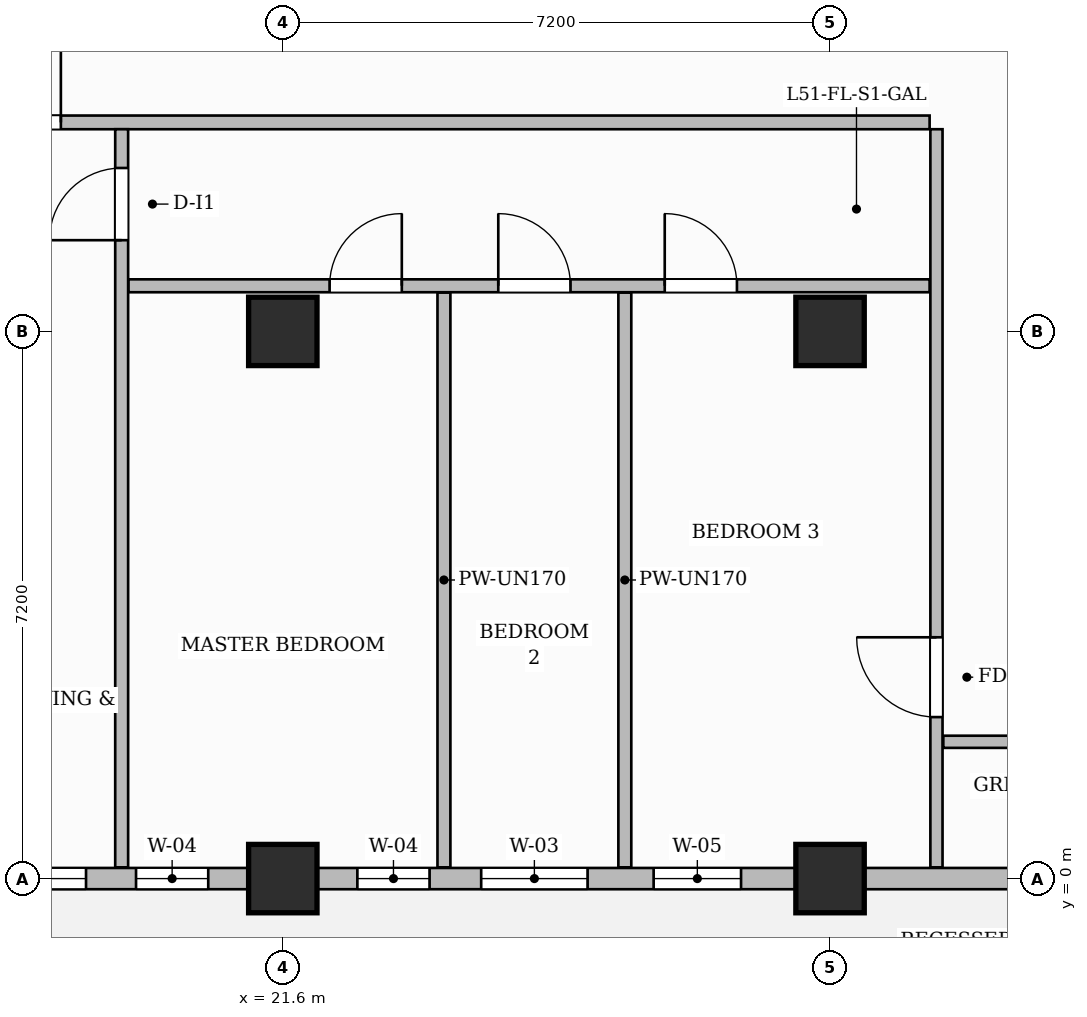
"""IFC4 building model, lengths in metres.
Left out: names, types, materials, properties, quantities, classifications, styles, units other than length and angle.
Written with IfcOpenShell. Run it as: python <this file> out.ifc"""

import sys

from ifc_helpers import new_model, si_unit, direction, frame, frame_2d, origin, origin_2d, place, context, subcontext, project, spatial, rectangle, extrude, source, transform, mapped, element, fill, save


model = new_model("IFC4")
c1 = context("Model", 3, precision=1e-05, world=origin(), true_north=direction((0.0, 1.0)))
c2 = subcontext(c1, "Body", "Model", "MODEL_VIEW")
j1 = project(units=[si_unit("LENGTHUNIT", "METRE"), si_unit("PLANEANGLEUNIT", "RADIAN")], contexts=[c1])
p1 = place(None, origin())
s1 = spatial("IfcSite", under=j1, at=p1, CompositionType="ELEMENT")
p2 = place(p1, origin())
s2 = spatial("IfcBuilding", under=s1, at=p2, CompositionType="ELEMENT")
p3 = place(p2, frame((0.0, 0.0, 205.75)))
s3 = spatial("IfcBuildingStorey", under=s2, at=p3, CompositionType="ELEMENT", Elevation=205.75)
m1 = source(origin(), c2, "Body", "SweptSolid", [
    extrude(rectangle(XDim=0.9, YDim=0.9, at=origin_2d()), origin(), (0.0, 0.0, 1.0), 3.85),
])
for number, where, z_axis, x_axis in (
    (1, (21.6, 0.0, 0.0), (0.0, 0.0, 1.0), (1.0, 0.0, 0.0)),
    (2, (21.6, 7.2, 0.0), (0.0, 0.0, 1.0), (1.0, 0.0, 0.0)),
    (3, (28.8, 0.0, 0.0), (0.0, 0.0, 1.0), (1.0, 0.0, 0.0)),
    (4, (28.8, 7.2, 0.0), (0.0, 0.0, 1.0), (1.0, 0.0, 0.0)),
):
    element("IfcColumn", number, at=place(p3, frame(where, z_axis=z_axis, x_axis=x_axis)), inside=s3, PredefinedType="COLUMN", context=c2, shape_type="MappedRepresentation", body=[
        mapped(m1, transform((0.0, 0.0, 0.0), scale=1.0)),
    ])
p4 = place(p3, frame((14.548, 9.95, 0.0), z_axis=(0.0, 0.0, 1.0), x_axis=(1.0, 0.0, 0.0)))
e5 = element("IfcWall", 5, at=p4, inside=s3, PredefinedType="PARTITIONING", context=c2, shape_type="SweptSolid", body=[
    extrude(rectangle(XDim=15.562, YDim=0.18, at=frame_2d((7.781, 0.0))), origin(), (0.0, 0.0, 1.0), 3.6),
])
p5 = place(p4, frame((3.082, 0.0, 0.0)))
e6 = element("IfcOpeningElement", 6, at=p5, cuts=e5, PredefinedType="OPENING", context=c2, shape_type="SweptSolid", body=[
    extrude(rectangle(XDim=1.05, YDim=2.25, at=frame_2d((0.525, 1.125))), frame((0.0, 0.1, 0.0), z_axis=(0.0, -1.0, 0.0), x_axis=(1.0, 0.0, 0.0)), (0.0, 0.0, 1.0), 0.2),
])
p6 = place(p3, frame((30.2, 0.148, 0.0), z_axis=(0.0, 0.0, 1.0), x_axis=(0.0, 1.0, 0.0)))
e7 = element("IfcWall", 7, at=p6, inside=s3, PredefinedType="PARTITIONING", context=c2, shape_type="SweptSolid", body=[
    extrude(rectangle(XDim=9.712, YDim=0.16, at=frame_2d((4.856, 0.0))), origin(), (0.0, 0.0, 1.0), 3.6),
])
p7 = place(p6, frame((1.977, 0.0, 0.0)))
e8 = element("IfcOpeningElement", 8, at=p7, cuts=e7, PredefinedType="OPENING", context=c2, shape_type="SweptSolid", body=[
    extrude(rectangle(XDim=1.05, YDim=2.15, at=frame_2d((0.525, 1.075))), frame((0.0, 0.09, 0.0), z_axis=(0.0, -1.0, 0.0), x_axis=(1.0, 0.0, 0.0)), (0.0, 0.0, 1.0), 0.18),
])
p8 = place(p3, frame((30.29, 1.8, 0.0), z_axis=(0.0, 0.0, 1.0), x_axis=(1.0, 0.0, 0.0)))
e9 = element("IfcWall", 9, at=p8, inside=s3, PredefinedType="PARTITIONING", context=c2, shape_type="SweptSolid", body=[
    extrude(rectangle(XDim=19.37, YDim=0.16, at=frame_2d((9.685, 0.0))), origin(), (0.0, 0.0, 1.0), 3.6),
])
p9 = place(p8, frame((3.054, 0.0, 0.0)))
e10 = element("IfcOpeningElement", 10, at=p9, cuts=e9, PredefinedType="OPENING", context=c2, shape_type="SweptSolid", body=[
    extrude(rectangle(XDim=0.9, YDim=2.15, at=frame_2d((0.45, 1.075))), frame((0.0, 0.09, 0.0), z_axis=(0.0, -1.0, 0.0), x_axis=(1.0, 0.0, 0.0)), (0.0, 0.0, 1.0), 0.18),
])
p10 = place(p8, frame((9.66, 0.0, 0.0)))
e11 = element("IfcOpeningElement", 11, at=p10, cuts=e9, PredefinedType="OPENING", context=c2, shape_type="SweptSolid", body=[
    extrude(rectangle(XDim=0.9, YDim=2.15, at=frame_2d((0.45, 1.075))), frame((0.0, 0.09, 0.0), z_axis=(0.0, -1.0, 0.0), x_axis=(1.0, 0.0, 0.0)), (0.0, 0.0, 1.0), 0.18),
])
p11 = place(p8, frame((15.86, 0.0, 0.0)))
e12 = element("IfcOpeningElement", 12, at=p11, cuts=e9, PredefinedType="OPENING", context=c2, shape_type="SweptSolid", body=[
    extrude(rectangle(XDim=0.9, YDim=2.15, at=frame_2d((0.45, 1.075))), frame((0.0, 0.09, 0.0), z_axis=(0.0, -1.0, 0.0), x_axis=(1.0, 0.0, 0.0)), (0.0, 0.0, 1.0), 0.18),
])
p12 = place(p3, frame((19.48, 0.148, 0.0), z_axis=(0.0, 0.0, 1.0), x_axis=(0.0, 1.0, 0.0)))
e13 = element("IfcWall", 13, at=p12, inside=s3, PredefinedType="PARTITIONING", context=c2, shape_type="SweptSolid", body=[
    extrude(rectangle(XDim=9.712, YDim=0.17, at=frame_2d((4.856, 0.0))), origin(), (0.0, 0.0, 1.0), 3.6),
])
p13 = place(p12, frame((8.252, 0.0, 0.0)))
e14 = element("IfcOpeningElement", 14, at=p13, cuts=e13, PredefinedType="OPENING", context=c2, shape_type="SweptSolid", body=[
    extrude(rectangle(XDim=0.95, YDim=2.15, at=frame_2d((0.475, 1.075))), frame((0.0, 0.095, 0.0), z_axis=(0.0, -1.0, 0.0), x_axis=(1.0, 0.0, 0.0)), (0.0, 0.0, 1.0), 0.19),
])
p14 = place(p3, frame((19.57, 7.8, 0.0), z_axis=(0.0, 0.0, 1.0), x_axis=(1.0, 0.0, 0.0)))
e15 = element("IfcWall", 15, at=p14, inside=s3, PredefinedType="PARTITIONING", context=c2, shape_type="SweptSolid", body=[
    extrude(rectangle(XDim=10.54, YDim=0.17, at=frame_2d((5.27, 0.0))), origin(), (0.0, 0.0, 1.0), 3.6),
])
p15 = place(p14, frame((2.646, 0.0, 0.0)))
e16 = element("IfcOpeningElement", 16, at=p15, cuts=e15, PredefinedType="OPENING", context=c2, shape_type="SweptSolid", body=[
    extrude(rectangle(XDim=0.95, YDim=2.15, at=frame_2d((0.475, 1.075))), frame((0.0, 0.095, 0.0), z_axis=(0.0, -1.0, 0.0), x_axis=(1.0, 0.0, 0.0)), (0.0, 0.0, 1.0), 0.19),
])
p16 = place(p14, frame((4.865, 0.0, 0.0)))
e17 = element("IfcOpeningElement", 17, at=p16, cuts=e15, PredefinedType="OPENING", context=c2, shape_type="SweptSolid", body=[
    extrude(rectangle(XDim=0.95, YDim=2.15, at=frame_2d((0.475, 1.075))), frame((0.0, 0.095, 0.0), z_axis=(0.0, -1.0, 0.0), x_axis=(1.0, 0.0, 0.0)), (0.0, 0.0, 1.0), 0.19),
])
p17 = place(p14, frame((7.055, 0.0, 0.0)))
e18 = element("IfcOpeningElement", 18, at=p17, cuts=e15, PredefinedType="OPENING", context=c2, shape_type="SweptSolid", body=[
    extrude(rectangle(XDim=0.95, YDim=2.15, at=frame_2d((0.475, 1.075))), frame((0.0, 0.095, 0.0), z_axis=(0.0, -1.0, 0.0), x_axis=(1.0, 0.0, 0.0)), (0.0, 0.0, 1.0), 0.19),
])
for number, where, z_axis, x_axis in (
    (19, (23.72, 0.148, 0.0), (0.0, 0.0, 1.0), (0.0, 1.0, 0.0)),
    (20, (26.1, 0.148, 0.0), (0.0, 0.0, 1.0), (0.0, 1.0, 0.0)),
):
    element("IfcWall", number, at=place(p3, frame(where, z_axis=z_axis, x_axis=x_axis)), inside=s3, PredefinedType="PARTITIONING", context=c2, shape_type="SweptSolid", body=[
        extrude(rectangle(XDim=7.562, YDim=0.17, at=frame_2d((3.781, 0.0))), origin(), (0.0, 0.0, 1.0), 3.6),
    ])
p18 = place(p3, frame((14.4, 0.0, 0.0), z_axis=(0.0, 0.0, 1.0), x_axis=(1.0, 0.0, 0.0)))
e21 = element("IfcWall", 21, at=p18, inside=s3, PredefinedType="SOLIDWALL", context=c2, shape_type="SweptSolid", body=[
    extrude(rectangle(XDim=35.4, YDim=0.28, at=frame_2d((17.7, 0.0))), origin(), (0.0, 0.0, 1.0), 3.085),
])
p19 = place(p18, frame((0.85, 0.0, 0.0)))
e22 = element("IfcOpeningElement", 22, at=p19, cuts=e21, PredefinedType="OPENING", context=c2, shape_type="SweptSolid", body=[
    extrude(rectangle(XDim=1.2, YDim=2.2, at=frame_2d((0.6, 1.1))), frame((0.0, 0.15, 0.0), z_axis=(0.0, -1.0, 0.0), x_axis=(1.0, 0.0, 0.0)), (0.0, 0.0, 1.0), 0.3),
])
p20 = place(p18, frame((2.811, 0.0, 0.8)))
e23 = element("IfcOpeningElement", 23, at=p20, cuts=e21, PredefinedType="OPENING", context=c2, shape_type="SweptSolid", body=[
    extrude(rectangle(XDim=1.8, YDim=1.85, at=frame_2d((0.9, 0.925))), frame((0.0, 0.15, 0.0), z_axis=(0.0, -1.0, 0.0), x_axis=(1.0, 0.0, 0.0)), (0.0, 0.0, 1.0), 0.3),
])
p21 = place(p18, frame((5.269, 0.0, 0.8)))
e24 = element("IfcOpeningElement", 24, at=p21, cuts=e21, PredefinedType="OPENING", context=c2, shape_type="SweptSolid", body=[
    extrude(rectangle(XDim=0.95, YDim=1.75, at=frame_2d((0.475, 0.875))), frame((0.0, 0.15, 0.0), z_axis=(0.0, -1.0, 0.0), x_axis=(1.0, 0.0, 0.0)), (0.0, 0.0, 1.0), 0.3),
])
p22 = place(p18, frame((8.181, 0.0, 0.8)))
e25 = element("IfcOpeningElement", 25, at=p22, cuts=e21, PredefinedType="OPENING", context=c2, shape_type="SweptSolid", body=[
    extrude(rectangle(XDim=0.95, YDim=1.75, at=frame_2d((0.475, 0.875))), frame((0.0, 0.15, 0.0), z_axis=(0.0, -1.0, 0.0), x_axis=(1.0, 0.0, 0.0)), (0.0, 0.0, 1.0), 0.3),
])
p23 = place(p18, frame((9.81, 0.0, 0.8)))
e26 = element("IfcOpeningElement", 26, at=p23, cuts=e21, PredefinedType="OPENING", context=c2, shape_type="SweptSolid", body=[
    extrude(rectangle(XDim=1.4, YDim=1.85, at=frame_2d((0.7, 0.925))), frame((0.0, 0.15, 0.0), z_axis=(0.0, -1.0, 0.0), x_axis=(1.0, 0.0, 0.0)), (0.0, 0.0, 1.0), 0.3),
])
p24 = place(p18, frame((12.079, 0.0, 0.8)))
e27 = element("IfcOpeningElement", 27, at=p24, cuts=e21, PredefinedType="OPENING", context=c2, shape_type="SweptSolid", body=[
    extrude(rectangle(XDim=1.15, YDim=1.8, at=frame_2d((0.575, 0.9))), frame((0.0, 0.15, 0.0), z_axis=(0.0, -1.0, 0.0), x_axis=(1.0, 0.0, 0.0)), (0.0, 0.0, 1.0), 0.3),
])
p25 = place(p18, frame((16.804, 0.0, 0.8)))
e28 = element("IfcOpeningElement", 28, at=p25, cuts=e21, PredefinedType="OPENING", context=c2, shape_type="SweptSolid", body=[
    extrude(rectangle(XDim=1.8, YDim=1.85, at=frame_2d((0.9, 0.925))), frame((0.0, 0.15, 0.0), z_axis=(0.0, -1.0, 0.0), x_axis=(1.0, 0.0, 0.0)), (0.0, 0.0, 1.0), 0.3),
])
p26 = place(p18, frame((21.521, 0.0, 0.8)))
e29 = element("IfcOpeningElement", 29, at=p26, cuts=e21, PredefinedType="OPENING", context=c2, shape_type="SweptSolid", body=[
    extrude(rectangle(XDim=0.95, YDim=1.75, at=frame_2d((0.475, 0.875))), frame((0.0, 0.15, 0.0), z_axis=(0.0, -1.0, 0.0), x_axis=(1.0, 0.0, 0.0)), (0.0, 0.0, 1.0), 0.3),
])
p27 = place(p18, frame((23.904, 0.0, 0.8)))
e30 = element("IfcOpeningElement", 30, at=p27, cuts=e21, PredefinedType="OPENING", context=c2, shape_type="SweptSolid", body=[
    extrude(rectangle(XDim=1.8, YDim=1.85, at=frame_2d((0.9, 0.925))), frame((0.0, 0.15, 0.0), z_axis=(0.0, -1.0, 0.0), x_axis=(1.0, 0.0, 0.0)), (0.0, 0.0, 1.0), 0.3),
])
p28 = place(p18, frame((29.681, 0.0, 0.8)))
e31 = element("IfcOpeningElement", 31, at=p28, cuts=e21, PredefinedType="OPENING", context=c2, shape_type="SweptSolid", body=[
    extrude(rectangle(XDim=1.8, YDim=1.85, at=frame_2d((0.9, 0.925))), frame((0.0, 0.15, 0.0), z_axis=(0.0, -1.0, 0.0), x_axis=(1.0, 0.0, 0.0)), (0.0, 0.0, 1.0), 0.3),
])
p29 = place(p18, frame((32.327, 0.0, 0.8)))
e32 = element("IfcOpeningElement", 32, at=p29, cuts=e21, PredefinedType="OPENING", context=c2, shape_type="SweptSolid", body=[
    extrude(rectangle(XDim=1.8, YDim=1.85, at=frame_2d((0.9, 0.925))), frame((0.0, 0.15, 0.0), z_axis=(0.0, -1.0, 0.0), x_axis=(1.0, 0.0, 0.0)), (0.0, 0.0, 1.0), 0.3),
])
m2 = source(origin(), c2, "Body", "SweptSolid", [
    extrude(rectangle(XDim=1.05, YDim=2.15, at=frame_2d((0.525, 1.075))), frame((0.0, 0.025, 0.0), z_axis=(0.0, -1.0, 0.0), x_axis=(1.0, 0.0, 0.0)), (0.0, 0.0, 1.0), 0.05),
])
p30 = place(p7, origin())
e33 = element("IfcDoor", 33, at=p30, inside=s3, OperationType="SINGLE_SWING_RIGHT", PredefinedType="DOOR", context=c2, shape_type="MappedRepresentation", body=[
    mapped(m2, transform((0.0, 0.0, 0.0), scale=1.0)),
])
fill(e8, e33)
m3 = source(origin(), c2, "Body", "SweptSolid", [
    extrude(rectangle(XDim=1.05, YDim=2.25, at=frame_2d((0.525, 1.125))), frame((0.0, 0.025, 0.0), z_axis=(0.0, -1.0, 0.0), x_axis=(1.0, 0.0, 0.0)), (0.0, 0.0, 1.0), 0.05),
])
p31 = place(p5, origin())
e34 = element("IfcDoor", 34, at=p31, inside=s3, OperationType="SINGLE_SWING_RIGHT", PredefinedType="DOOR", context=c2, shape_type="MappedRepresentation", body=[
    mapped(m3, transform((0.0, 0.0, 0.0), scale=1.0)),
])
fill(e6, e34)
m4 = source(origin(), c2, "Body", "SweptSolid", [
    extrude(rectangle(XDim=0.95, YDim=2.15, at=frame_2d((0.475, 1.075))), frame((0.0, 0.025, 0.0), z_axis=(0.0, -1.0, 0.0), x_axis=(1.0, 0.0, 0.0)), (0.0, 0.0, 1.0), 0.05),
])
p32 = place(p13, origin())
e35 = element("IfcDoor", 35, at=p32, inside=s3, OperationType="SINGLE_SWING_LEFT", PredefinedType="DOOR", context=c2, shape_type="MappedRepresentation", body=[
    mapped(m4, transform((0.0, 0.0, 0.0), scale=1.0)),
])
fill(e14, e35)
p33 = place(p15, origin())
e36 = element("IfcDoor", 36, at=p33, inside=s3, OperationType="SINGLE_SWING_RIGHT", PredefinedType="DOOR", context=c2, shape_type="MappedRepresentation", body=[
    mapped(m4, transform((0.0, 0.0, 0.0), scale=1.0)),
])
fill(e16, e36)
p34 = place(p16, origin())
e37 = element("IfcDoor", 37, at=p34, inside=s3, OperationType="SINGLE_SWING_LEFT", PredefinedType="DOOR", context=c2, shape_type="MappedRepresentation", body=[
    mapped(m4, transform((0.0, 0.0, 0.0), scale=1.0)),
])
fill(e17, e37)
p35 = place(p17, origin())
e38 = element("IfcDoor", 38, at=p35, inside=s3, OperationType="SINGLE_SWING_LEFT", PredefinedType="DOOR", context=c2, shape_type="MappedRepresentation", body=[
    mapped(m4, transform((0.0, 0.0, 0.0), scale=1.0)),
])
fill(e18, e38)
m5 = source(origin(), c2, "Body", "SweptSolid", [
    extrude(rectangle(XDim=1.8, YDim=1.85, at=frame_2d((0.9, 0.925))), frame((0.0, 0.03, 0.0), z_axis=(0.0, -1.0, 0.0), x_axis=(1.0, 0.0, 0.0)), (0.0, 0.0, 1.0), 0.06),
])
p36 = place(p20, origin())
e39 = element("IfcWindow", 39, at=p36, inside=s3, PartitioningType="DOUBLE_PANEL_VERTICAL", PredefinedType="WINDOW", context=c2, shape_type="MappedRepresentation", body=[
    mapped(m5, transform((0.0, 0.0, 0.0), scale=1.0)),
])
fill(e23, e39)
m6 = source(origin(), c2, "Body", "SweptSolid", [
    extrude(rectangle(XDim=0.95, YDim=1.75, at=frame_2d((0.475, 0.875))), frame((0.0, 0.03, 0.0), z_axis=(0.0, -1.0, 0.0), x_axis=(1.0, 0.0, 0.0)), (0.0, 0.0, 1.0), 0.06),
])
p37 = place(p21, origin())
e40 = element("IfcWindow", 40, at=p37, inside=s3, PartitioningType="SINGLE_PANEL", PredefinedType="WINDOW", context=c2, shape_type="MappedRepresentation", body=[
    mapped(m6, transform((0.0, 0.0, 0.0), scale=1.0)),
])
fill(e24, e40)
p38 = place(p22, origin())
e41 = element("IfcWindow", 41, at=p38, inside=s3, PartitioningType="SINGLE_PANEL", PredefinedType="WINDOW", context=c2, shape_type="MappedRepresentation", body=[
    mapped(m6, transform((0.0, 0.0, 0.0), scale=1.0)),
])
fill(e25, e41)
m7 = source(origin(), c2, "Body", "SweptSolid", [
    extrude(rectangle(XDim=1.4, YDim=1.85, at=frame_2d((0.7, 0.925))), frame((0.0, 0.03, 0.0), z_axis=(0.0, -1.0, 0.0), x_axis=(1.0, 0.0, 0.0)), (0.0, 0.0, 1.0), 0.06),
])
p39 = place(p23, origin())
e42 = element("IfcWindow", 42, at=p39, inside=s3, PartitioningType="SINGLE_PANEL", PredefinedType="WINDOW", context=c2, shape_type="MappedRepresentation", body=[
    mapped(m7, transform((0.0, 0.0, 0.0), scale=1.0)),
])
fill(e26, e42)
m8 = source(origin(), c2, "Body", "SweptSolid", [
    extrude(rectangle(XDim=1.15, YDim=1.8, at=frame_2d((0.575, 0.9))), frame((0.0, 0.03, 0.0), z_axis=(0.0, -1.0, 0.0), x_axis=(1.0, 0.0, 0.0)), (0.0, 0.0, 1.0), 0.06),
])
p40 = place(p24, origin())
e43 = element("IfcWindow", 43, at=p40, inside=s3, PartitioningType="SINGLE_PANEL", PredefinedType="WINDOW", context=c2, shape_type="MappedRepresentation", body=[
    mapped(m8, transform((0.0, 0.0, 0.0), scale=1.0)),
])
fill(e27, e43)
save(model, sys.argv[1])
